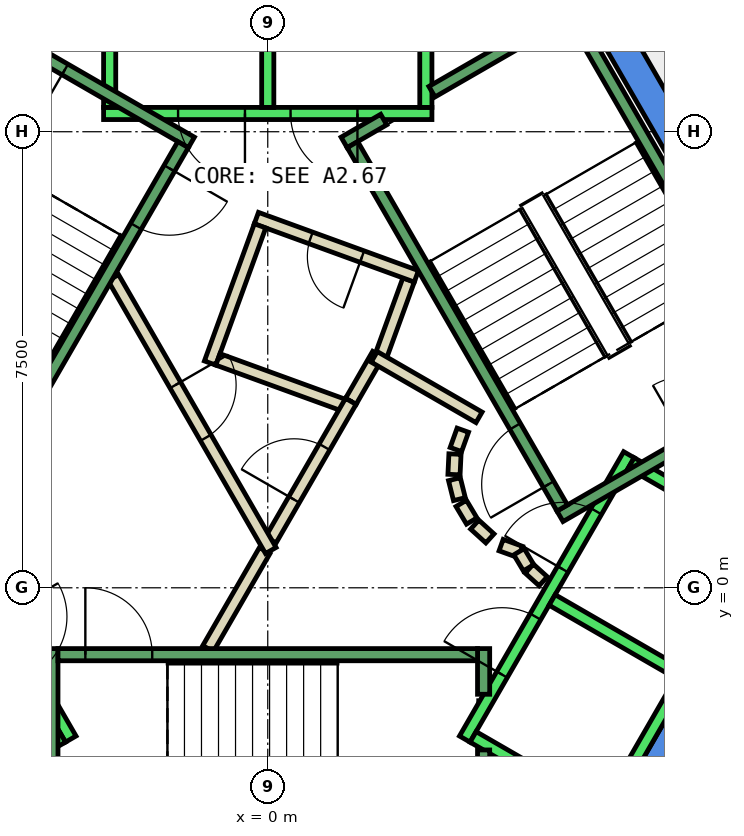
"""IFC4 building model, lengths in metres.
Left out: names, types, materials, properties, quantities, classifications, styles, units other than length and angle.
Written with IfcOpenShell. Run it as: python <this file> out.ifc"""

import sys

from ifc_helpers import new_model, si_unit, direction, frame, frame_2d, origin, place, context, subcontext, project, spatial, polyline, rectangle, outline, extrude, element, fill, save


model = new_model("IFC4")
c1 = context("Model", 3, precision=1e-05, world=origin(), true_north=direction((0.0, 1.0)))
c2 = subcontext(c1, "Body", "Model", "MODEL_VIEW")
j1 = project(units=[si_unit("LENGTHUNIT", "METRE"), si_unit("PLANEANGLEUNIT", "RADIAN")], contexts=[c1])
p1 = place(None, origin())
s1 = spatial("IfcSite", under=j1, at=p1, CompositionType="ELEMENT")
p2 = place(p1, origin())
s2 = spatial("IfcBuilding", under=s1, at=p2, CompositionType="ELEMENT")
p3 = place(p2, frame((0.0, 0.0, 318.8)))
s3 = spatial("IfcBuildingStorey", under=s2, at=p3, CompositionType="ELEMENT", Elevation=318.8)
p4 = place(p3, frame((0.0, 0.0, -0.34)))
e1 = element("IfcWall", 1, at=p4, inside=s3, PredefinedType="SHEAR", context=c2, shape_type="SweptSolid", body=[
    extrude(outline(polyline([(5.486, 9.998), (5.053, 9.748), (9.238, 2.5), (9.815, 2.5), (5.486, 9.998)])), origin(), (0.0, 0.0, 1.0), 3.6),
])
p5 = place(p3, frame((0.0, 0.0, -0.34)))
e2 = element("IfcWall", 2, at=p5, inside=s3, PredefinedType="SHEAR", context=c2, shape_type="SweptSolid", body=[
    extrude(outline(polyline([(4.907, -6.0), (9.815, 2.5), (9.238, 2.5), (4.619, -5.5), (4.907, -6.0)])), origin(), (0.0, 0.0, 1.0), 3.6),
])
p6 = place(p3, frame((1.366, 3.066, 0.0), z_axis=(0.0, 0.0, 1.0), x_axis=(0.499698775601, 0.866199245938, 0.0)))
e3 = element("IfcWall", 3, at=p6, inside=s3, PredefinedType="PARTITIONING", context=c2, shape_type="SweptSolid", body=[
    extrude(rectangle(XDim=0.893, YDim=0.2, at=frame_2d((0.446, 0.0))), origin(), (0.0, 0.0, 1.0), 3.26),
])
p7 = place(p3, frame((1.838, 3.748, 0.0), z_axis=(0.0, 0.0, 1.0), x_axis=(0.341883255813, 0.939742432475, 0.0)))
e4 = element("IfcWall", 4, at=p7, inside=s3, PredefinedType="PARTITIONING", context=c2, shape_type="SweptSolid", body=[
    extrude(rectangle(XDim=1.398, YDim=0.2, at=frame_2d((0.699, 0.0))), origin(), (0.0, 0.0, 1.0), 3.26),
])
p8 = place(p3, frame((2.444, 5.122, 0.0), z_axis=(0.0, 0.0, 1.0), x_axis=(-0.939650782256, 0.342135071873, 0.0)))
e5 = element("IfcWall", 5, at=p8, inside=s3, PredefinedType="PARTITIONING", context=c2, shape_type="SweptSolid", body=[
    extrude(rectangle(XDim=2.8, YDim=0.2, at=frame_2d((1.4, 0.0))), origin(), (0.0, 0.0, 1.0), 3.26),
])
p9 = place(p8, frame((0.95, 0.0, 0.0)))
e6 = element("IfcOpeningElement", 6, at=p9, cuts=e5, PredefinedType="OPENING", context=c2, shape_type="SweptSolid", body=[
    extrude(rectangle(XDim=0.9, YDim=2.1, at=frame_2d((0.45, 1.05))), frame((0.0, 0.11, 0.0), z_axis=(0.0, -1.0, 0.0), x_axis=(1.0, 0.0, 0.0)), (0.0, 0.0, 1.0), 0.22),
])
p10 = place(p3, frame((-0.127, 5.952, 0.0), z_axis=(0.0, 0.0, 1.0), x_axis=(-0.342012513308, -0.93969539785, 0.0)))
e7 = element("IfcWall", 7, at=p10, inside=s3, PredefinedType="PARTITIONING", context=c2, shape_type="SweptSolid", body=[
    extrude(rectangle(XDim=2.401, YDim=0.2, at=frame_2d((1.2, 0.0))), origin(), (0.0, 0.0, 1.0), 3.26),
])
p11 = place(p3, frame((-0.82, 3.756, 0.0), z_axis=(0.0, 0.0, 1.0), x_axis=(0.939740098492, -0.34188967122, 0.0)))
e8 = element("IfcWall", 8, at=p11, inside=s3, PredefinedType="PARTITIONING", context=c2, shape_type="SweptSolid", body=[
    extrude(rectangle(XDim=2.273, YDim=0.2, at=frame_2d((1.136, 0.0))), origin(), (0.0, 0.0, 1.0), 3.26),
])
p12 = place(p3, frame((-0.982, -1.0, 0.0), z_axis=(0.0, 0.0, 1.0), x_axis=(0.50024047865, 0.865886518847, 0.0)))
e9 = element("IfcWall", 9, at=p12, inside=s3, PredefinedType="PARTITIONING", context=c2, shape_type="SweptSolid", body=[
    extrude(rectangle(XDim=1.863, YDim=0.2, at=frame_2d((0.931, 0.0))), origin(), (0.0, 0.0, 1.0), 3.26),
])
p13 = place(p3, frame((0.05, 0.787, 0.0), z_axis=(0.0, 0.0, 1.0), x_axis=(0.500070457302, 0.865984721421, 0.0)))
e10 = element("IfcWall", 10, at=p13, inside=s3, PredefinedType="PARTITIONING", context=c2, shape_type="SweptSolid", body=[
    extrude(rectangle(XDim=2.631, YDim=0.2, at=frame_2d((1.316, 0.0))), origin(), (0.0, 0.0, 1.0), 3.26),
])
p14 = place(p13, frame((0.766, 0.0, 0.0)))
e11 = element("IfcOpeningElement", 11, at=p14, cuts=e10, PredefinedType="OPENING", context=c2, shape_type="SweptSolid", body=[
    extrude(rectangle(XDim=1.0, YDim=2.1, at=frame_2d((0.5, 1.05))), frame((0.0, 0.11, 0.0), z_axis=(0.0, -1.0, 0.0), x_axis=(1.0, 0.0, 0.0)), (0.0, 0.0, 1.0), 0.22),
])
p15 = place(p3, frame((1.751, 3.798, 0.0), z_axis=(0.0, 0.0, 1.0), x_axis=(0.866091650241, -0.499885240213, 0.0)))
e12 = element("IfcWall", 12, at=p15, inside=s3, PredefinedType="PARTITIONING", context=c2, shape_type="SweptSolid", body=[
    extrude(rectangle(XDim=1.991, YDim=0.2, at=frame_2d((0.995, 0.0))), origin(), (0.0, 0.0, 1.0), 3.26),
])
p16 = place(p3, frame((3.208, 2.592, 0.0), z_axis=(0.0, 0.0, 1.0), x_axis=(-0.337388820924, -0.941365382578, 0.0)))
e13 = element("IfcWall", 13, at=p16, inside=s3, PredefinedType="PARTITIONING", context=c2, shape_type="SweptSolid", body=[
    extrude(rectangle(XDim=0.338, YDim=0.2, at=frame_2d((0.169, 0.0))), origin(), (0.0, 0.0, 1.0), 3.26),
])
p17 = place(p3, frame((3.079, 2.199, 0.0), z_axis=(0.0, 0.0, 1.0), x_axis=(-0.047771483479, -0.998858290933, 0.0)))
e14 = element("IfcWall", 14, at=p17, inside=s3, PredefinedType="PARTITIONING", context=c2, shape_type="SweptSolid", body=[
    extrude(rectangle(XDim=0.337, YDim=0.2, at=frame_2d((0.169, 0.0))), origin(), (0.0, 0.0, 1.0), 3.26),
])
p18 = place(p3, frame((3.07, 1.786, 0.0), z_axis=(0.0, 0.0, 1.0), x_axis=(0.242705583207, -0.970099994784, 0.0)))
e15 = element("IfcWall", 15, at=p18, inside=s3, PredefinedType="PARTITIONING", context=c2, shape_type="SweptSolid", body=[
    extrude(rectangle(XDim=0.338, YDim=0.2, at=frame_2d((0.169, 0.0))), origin(), (0.0, 0.0, 1.0), 3.26),
])
for number, where, z_axis, x_axis in (
    (16, (3.182, 1.388, 0.0), (0.0, 0.0, 1.0), (0.512, -0.859, 0.0)),
    (17, (3.404, 1.039, 0.0), (0.0, 0.0, 1.0), (0.74, -0.672, 0.0)),
):
    element("IfcWall", number, at=place(p3, frame(where, z_axis=z_axis, x_axis=x_axis)), inside=s3, PredefinedType="PARTITIONING", context=c2, shape_type="SweptSolid", body=[
        extrude(rectangle(XDim=0.338, YDim=0.2, at=frame_2d((0.169, 0.0))), origin(), (0.0, 0.0, 1.0), 3.26),
    ])
p19 = place(p3, frame((3.838, 0.702, 0.0), z_axis=(0.0, 0.0, 1.0), x_axis=(0.941035081519, -0.338308993895, 0.0)))
e18 = element("IfcWall", 18, at=p19, inside=s3, PredefinedType="PARTITIONING", context=c2, shape_type="SweptSolid", body=[
    extrude(rectangle(XDim=0.337, YDim=0.2, at=frame_2d((0.168, 0.0))), origin(), (0.0, 0.0, 1.0), 3.26),
])
p20 = place(p3, frame((4.132, 0.593, 0.0), z_axis=(0.0, 0.0, 1.0), x_axis=(0.513561617048, -0.858052717201, 0.0)))
e19 = element("IfcWall", 19, at=p20, inside=s3, PredefinedType="PARTITIONING", context=c2, shape_type="SweptSolid", body=[
    extrude(rectangle(XDim=0.308, YDim=0.2, at=frame_2d((0.154, 0.0))), origin(), (0.0, 0.0, 1.0), 3.26),
])
p21 = place(p3, frame((4.301, 0.315, 0.0), z_axis=(0.0, 0.0, 1.0), x_axis=(0.741798017506, -0.670623367639, 0.0)))
e20 = element("IfcWall", 20, at=p21, inside=s3, PredefinedType="PARTITIONING", context=c2, shape_type="SweptSolid", body=[
    extrude(rectangle(XDim=0.309, YDim=0.2, at=frame_2d((0.154, 0.0))), origin(), (0.0, 0.0, 1.0), 3.26),
])
p22 = place(p3, frame((-2.54, 5.1, 0.0), z_axis=(0.0, 0.0, 1.0), x_axis=(0.499925051871, -0.866068670783, 0.0)))
e21 = element("IfcWall", 21, at=p22, inside=s3, PredefinedType="PARTITIONING", context=c2, shape_type="SweptSolid", body=[
    extrude(rectangle(XDim=5.181, YDim=0.2, at=frame_2d((2.59, 0.0))), origin(), (0.0, 0.0, 1.0), 3.26),
])
p23 = place(p22, frame((2.04, 0.0, 0.0)))
e22 = element("IfcOpeningElement", 22, at=p23, cuts=e21, PredefinedType="OPENING", context=c2, shape_type="SweptSolid", body=[
    extrude(rectangle(XDim=1.0, YDim=2.1, at=frame_2d((0.5, 1.05))), frame((0.0, 0.11, 0.0), z_axis=(0.0, -1.0, 0.0), x_axis=(1.0, 0.0, 0.0)), (0.0, 0.0, 1.0), 0.22),
])
p24 = place(p3, frame((2.7, 7.8, 0.0), z_axis=(0.0, 0.0, 1.0), x_axis=(-1.0, 0.0, 0.0)))
e23 = element("IfcWall", 23, at=p24, inside=s3, PredefinedType="STANDARD", context=c2, shape_type="SweptSolid", body=[
    extrude(rectangle(XDim=5.4, YDim=0.2, at=frame_2d((2.7, 0.0))), origin(), (0.0, 0.0, 1.0), 3.26),
])
p25 = place(p24, frame((1.225, 0.0, 0.0)))
e24 = element("IfcOpeningElement", 24, at=p25, cuts=e23, PredefinedType="OPENING", context=c2, shape_type="SweptSolid", body=[
    extrude(rectangle(XDim=1.1, YDim=2.1, at=frame_2d((0.55, 1.05))), frame((0.0, 0.11, 0.0), z_axis=(0.0, -1.0, 0.0), x_axis=(1.0, 0.0, 0.0)), (0.0, 0.0, 1.0), 0.22),
])
p26 = place(p24, frame((3.075, 0.0, 0.0)))
e25 = element("IfcOpeningElement", 25, at=p26, cuts=e23, PredefinedType="OPENING", context=c2, shape_type="SweptSolid", body=[
    extrude(rectangle(XDim=1.1, YDim=2.1, at=frame_2d((0.55, 1.05))), frame((0.0, 0.11, 0.0), z_axis=(0.0, -1.0, 0.0), x_axis=(1.0, 0.0, 0.0)), (0.0, 0.0, 1.0), 0.22),
])
for number, where, z_axis, x_axis in (
    (26, (2.6, 7.9, 0.0), (0.0, 0.0, 1.0), (0.0, 1.0, 0.0)),
    (27, (0.0, 7.9, 0.0), (0.0, 0.0, 1.0), (0.0, 1.0, 0.0)),
    (28, (-2.6, 7.9, 0.0), (0.0, 0.0, 1.0), (0.0, 1.0, 0.0)),
):
    element("IfcWall", number, at=place(p3, frame(where, z_axis=z_axis, x_axis=x_axis)), inside=s3, PredefinedType="STANDARD", context=c2, shape_type="SweptSolid", body=[
        extrude(rectangle(XDim=2.4, YDim=0.2, at=frame_2d((1.2, 0.0))), origin(), (0.0, 0.0, 1.0), 3.26),
    ])
p27 = place(p3, frame((-5.94, 2.188, 0.0), z_axis=(0.0, 0.0, 1.0), x_axis=(0.500034260056, -0.866005622828, 0.0)))
e29 = element("IfcWall", 29, at=p27, inside=s3, PredefinedType="STANDARD", context=c2, shape_type="SweptSolid", body=[
    extrude(rectangle(XDim=5.399, YDim=0.2, at=frame_2d((2.7, 0.0))), origin(), (0.0, 0.0, 1.0), 3.26),
])
p28 = place(p27, frame((3.075, 0.0, 0.0)))
e30 = element("IfcOpeningElement", 30, at=p28, cuts=e29, PredefinedType="OPENING", context=c2, shape_type="SweptSolid", body=[
    extrude(rectangle(XDim=1.1, YDim=2.1, at=frame_2d((0.55, 1.05))), frame((0.0, 0.11, 0.0), z_axis=(0.0, -1.0, 0.0), x_axis=(1.0, 0.0, 0.0)), (0.0, 0.0, 1.0), 0.22),
])
p29 = place(p27, frame((1.225, 0.0, 0.0)))
e31 = element("IfcOpeningElement", 31, at=p29, cuts=e29, PredefinedType="OPENING", context=c2, shape_type="SweptSolid", body=[
    extrude(rectangle(XDim=1.1, YDim=2.1, at=frame_2d((0.55, 1.05))), frame((0.0, 0.11, 0.0), z_axis=(0.0, -1.0, 0.0), x_axis=(1.0, 0.0, 0.0)), (0.0, 0.0, 1.0), 0.22),
])
p30 = place(p3, frame((-3.377, -2.452, 0.0), z_axis=(0.0, 0.0, 1.0), x_axis=(-0.865955154139, -0.50012165622, 0.0)))
e32 = element("IfcWall", 32, at=p30, inside=s3, PredefinedType="STANDARD", context=c2, shape_type="SweptSolid", body=[
    extrude(rectangle(XDim=2.4, YDim=0.2, at=frame_2d((1.2, 0.0))), origin(), (0.0, 0.0, 1.0), 3.26),
])
p31 = place(p3, frame((3.24, -2.488, 0.0), z_axis=(0.0, 0.0, 1.0), x_axis=(0.500034260056, 0.866005622828, 0.0)))
e33 = element("IfcWall", 33, at=p31, inside=s3, PredefinedType="STANDARD", context=c2, shape_type="SweptSolid", body=[
    extrude(rectangle(XDim=5.399, YDim=0.2, at=frame_2d((2.7, 0.0))), origin(), (0.0, 0.0, 1.0), 3.26),
])
p32 = place(p31, frame((3.225, 0.0, 0.0)))
e34 = element("IfcOpeningElement", 34, at=p32, cuts=e33, PredefinedType="OPENING", context=c2, shape_type="SweptSolid", body=[
    extrude(rectangle(XDim=1.1, YDim=2.1, at=frame_2d((0.55, 1.05))), frame((0.0, 0.11, 0.0), z_axis=(0.0, -1.0, 0.0), x_axis=(1.0, 0.0, 0.0)), (0.0, 0.0, 1.0), 0.22),
])
p33 = place(p31, frame((1.225, 0.0, 0.0)))
e35 = element("IfcOpeningElement", 35, at=p33, cuts=e33, PredefinedType="OPENING", context=c2, shape_type="SweptSolid", body=[
    extrude(rectangle(XDim=1.1, YDim=2.1, at=frame_2d((0.55, 1.05))), frame((0.0, 0.11, 0.0), z_axis=(0.0, -1.0, 0.0), x_axis=(1.0, 0.0, 0.0)), (0.0, 0.0, 1.0), 0.22),
])
p34 = place(p3, frame((5.492, -3.788, 0.0), z_axis=(0.0, 0.0, 1.0), x_axis=(0.500034260056, 0.866005622828, 0.0)))
e36 = element("IfcWall", 36, at=p34, inside=s3, PredefinedType="STANDARD", context=c2, shape_type="SweptSolid", body=[
    extrude(rectangle(XDim=5.399, YDim=0.2, at=frame_2d((2.7, 0.0))), origin(), (0.0, 0.0, 1.0), 3.26),
])
p35 = place(p3, frame((3.377, -2.452, 0.0), z_axis=(0.0, 0.0, 1.0), x_axis=(0.865955154139, -0.50012165622, 0.0)))
e37 = element("IfcWall", 37, at=p35, inside=s3, PredefinedType="STANDARD", context=c2, shape_type="SweptSolid", body=[
    extrude(rectangle(XDim=2.4, YDim=0.2, at=frame_2d((1.2, 0.0))), origin(), (0.0, 0.0, 1.0), 3.26),
])
for number, where, z_axis, x_axis in (
    (38, (4.677, -0.2, 0.0), (0.0, 0.0, 1.0), (0.866, -0.5, 0.0)),
    (39, (5.977, 2.052, 0.0), (0.0, 0.0, 1.0), (0.866, -0.5, 0.0)),
):
    element("IfcWall", number, at=place(p3, frame(where, z_axis=z_axis, x_axis=x_axis)), inside=s3, PredefinedType="STANDARD", context=c2, shape_type="SweptSolid", body=[
        extrude(rectangle(XDim=2.399, YDim=0.2, at=frame_2d((1.2, 0.0))), origin(), (0.0, 0.0, 1.0), 3.26),
    ])
p36 = place(p3, frame((-3.55, -1.0, 0.0), z_axis=(0.0, 0.0, 1.0), x_axis=(0.0, -1.0, 0.0)))
e40 = element("IfcWall", 40, at=p36, inside=s3, PredefinedType="STANDARD", context=c2, shape_type="SweptSolid", body=[
    extrude(rectangle(XDim=4.4, YDim=0.2, at=frame_2d((2.2, 0.0))), origin(), (0.0, 0.0, 1.0), 3.26),
])
p37 = place(p36, frame((2.4, 0.0, 0.0)))
e41 = element("IfcOpeningElement", 41, at=p37, cuts=e40, PredefinedType="OPENING", context=c2, shape_type="SweptSolid", body=[
    extrude(rectangle(XDim=1.1, YDim=2.2, at=frame_2d((0.55, 1.1))), frame((0.0, 0.11, 0.0), z_axis=(0.0, -1.0, 0.0), x_axis=(1.0, 0.0, 0.0)), (0.0, 0.0, 1.0), 0.22),
])
p38 = place(p3, frame((3.55, -2.667, 0.0), z_axis=(0.0, 0.0, 1.0), x_axis=(0.0, -1.0, 0.0)))
e42 = element("IfcWall", 42, at=p38, inside=s3, PredefinedType="STANDARD", context=c2, shape_type="SweptSolid", body=[
    extrude(rectangle(XDim=2.733, YDim=0.2, at=frame_2d((1.366, 0.0))), origin(), (0.0, 0.0, 1.0), 3.26),
])
p39 = place(p3, frame((3.55, -1.0, 0.0), z_axis=(0.0, 0.0, 1.0), x_axis=(0.0, -1.0, 0.0)))
e43 = element("IfcWall", 43, at=p39, inside=s3, PredefinedType="STANDARD", context=c2, shape_type="SweptSolid", body=[
    extrude(rectangle(XDim=0.751, YDim=0.2, at=frame_2d((0.375, 0.0))), origin(), (0.0, 0.0, 1.0), 3.26),
])
p40 = place(p3, frame((-3.45, -1.1, 0.0), z_axis=(0.0, 0.0, 1.0), x_axis=(1.0, 0.0, 0.0)))
e44 = element("IfcWall", 44, at=p40, inside=s3, PredefinedType="STANDARD", context=c2, shape_type="SweptSolid", body=[
    extrude(rectangle(XDim=6.9, YDim=0.2, at=frame_2d((3.45, 0.0))), origin(), (0.0, 0.0, 1.0), 3.26),
])
p41 = place(p40, frame((0.45, 0.0, 0.0)))
e45 = element("IfcOpeningElement", 45, at=p41, cuts=e44, PredefinedType="OPENING", context=c2, shape_type="SweptSolid", body=[
    extrude(rectangle(XDim=1.1, YDim=2.2, at=frame_2d((0.55, 1.1))), frame((0.0, 0.11, 0.0), z_axis=(0.0, -1.0, 0.0), x_axis=(1.0, 0.0, 0.0)), (0.0, 0.0, 1.0), 0.22),
])
p42 = place(p3, frame((4.806, 1.176, 0.0), z_axis=(0.0, 0.0, 1.0), x_axis=(0.866059941101, 0.499940174841, 0.0)))
e46 = element("IfcWall", 46, at=p42, inside=s3, PredefinedType="STANDARD", context=c2, shape_type="SweptSolid", body=[
    extrude(rectangle(XDim=4.4, YDim=0.2, at=frame_2d((2.2, 0.0))), origin(), (0.0, 0.0, 1.0), 3.26),
])
p43 = place(p42, frame((2.4, 0.0, 0.0)))
e47 = element("IfcOpeningElement", 47, at=p43, cuts=e46, PredefinedType="OPENING", context=c2, shape_type="SweptSolid", body=[
    extrude(rectangle(XDim=1.1, YDim=2.2, at=frame_2d((0.55, 1.1))), frame((0.0, 0.11, 0.0), z_axis=(0.0, -1.0, 0.0), x_axis=(1.0, 0.0, 0.0)), (0.0, 0.0, 1.0), 0.22),
])
p44 = place(p3, frame((2.7, 8.158, 0.0), z_axis=(0.0, 0.0, 1.0), x_axis=(0.86611865017, 0.499838457731, 0.0)))
e48 = element("IfcWall", 48, at=p44, inside=s3, PredefinedType="STANDARD", context=c2, shape_type="SweptSolid", body=[
    extrude(rectangle(XDim=2.733, YDim=0.2, at=frame_2d((1.366, 0.0))), origin(), (0.0, 0.0, 1.0), 3.26),
])
p45 = place(p3, frame((1.256, 7.324, 0.0), z_axis=(0.0, 0.0, 1.0), x_axis=(0.865915093549, 0.500191014278, 0.0)))
e49 = element("IfcWall", 49, at=p45, inside=s3, PredefinedType="STANDARD", context=c2, shape_type="SweptSolid", body=[
    extrude(rectangle(XDim=0.752, YDim=0.2, at=frame_2d((0.376, 0.0))), origin(), (0.0, 0.0, 1.0), 3.26),
])
p46 = place(p3, frame((4.843, 1.312, 0.0), z_axis=(0.0, 0.0, 1.0), x_axis=(-0.499963383562, 0.866046543262, 0.0)))
e50 = element("IfcWall", 50, at=p46, inside=s3, PredefinedType="STANDARD", context=c2, shape_type="SweptSolid", body=[
    extrude(rectangle(XDim=6.9, YDim=0.2, at=frame_2d((3.45, 0.0))), origin(), (0.0, 0.0, 1.0), 3.26),
])
p47 = place(p46, frame((0.45, 0.0, 0.0)))
e51 = element("IfcOpeningElement", 51, at=p47, cuts=e50, PredefinedType="OPENING", context=c2, shape_type="SweptSolid", body=[
    extrude(rectangle(XDim=1.1, YDim=2.2, at=frame_2d((0.55, 1.1))), frame((0.0, 0.11, 0.0), z_axis=(0.0, -1.0, 0.0), x_axis=(1.0, 0.0, 0.0)), (0.0, 0.0, 1.0), 0.22),
])
p48 = place(p3, frame((8.48, 3.412, 0.0), z_axis=(0.0, 0.0, 1.0), x_axis=(-0.499978703459, 0.866037698999, 0.0)))
e52 = element("IfcWall", 52, at=p48, inside=s3, PredefinedType="STANDARD", context=c2, shape_type="SweptSolid", body=[
    extrude(rectangle(XDim=6.9, YDim=0.2, at=frame_2d((3.45, 0.0))), origin(), (0.0, 0.0, 1.0), 3.26),
])
p49 = place(p3, frame((-1.256, 7.324, 0.0), z_axis=(0.0, 0.0, 1.0), x_axis=(-0.866046073146, 0.499964197906, 0.0)))
e53 = element("IfcWall", 53, at=p49, inside=s3, PredefinedType="STANDARD", context=c2, shape_type="SweptSolid", body=[
    extrude(rectangle(XDim=4.4, YDim=0.2, at=frame_2d((2.2, 0.0))), origin(), (0.0, 0.0, 1.0), 3.26),
])
p50 = place(p49, frame((2.4, 0.0, 0.0)))
e54 = element("IfcOpeningElement", 54, at=p50, cuts=e53, PredefinedType="OPENING", context=c2, shape_type="SweptSolid", body=[
    extrude(rectangle(XDim=1.1, YDim=2.2, at=frame_2d((0.55, 1.1))), frame((0.0, 0.11, 0.0), z_axis=(0.0, -1.0, 0.0), x_axis=(1.0, 0.0, 0.0)), (0.0, 0.0, 1.0), 0.22),
])
p51 = place(p3, frame((-1.393, 7.288, 0.0), z_axis=(0.0, 0.0, 1.0), x_axis=(-0.499963383562, -0.866046543262, 0.0)))
e55 = element("IfcWall", 55, at=p51, inside=s3, PredefinedType="STANDARD", context=c2, shape_type="SweptSolid", body=[
    extrude(rectangle(XDim=6.9, YDim=0.2, at=frame_2d((3.45, 0.0))), origin(), (0.0, 0.0, 1.0), 3.26),
])
p52 = place(p51, frame((0.45, 0.0, 0.0)))
e56 = element("IfcOpeningElement", 56, at=p52, cuts=e55, PredefinedType="OPENING", context=c2, shape_type="SweptSolid", body=[
    extrude(rectangle(XDim=1.1, YDim=2.2, at=frame_2d((0.55, 1.1))), frame((0.0, 0.11, 0.0), z_axis=(0.0, -1.0, 0.0), x_axis=(1.0, 0.0, 0.0)), (0.0, 0.0, 1.0), 0.22),
])
p53 = place(p14, origin())
e57 = element("IfcDoor", 57, at=p53, inside=s3, OperationType="SINGLE_SWING_RIGHT", PredefinedType="DOOR", context=c2, shape_type="SweptSolid", body=[
    extrude(rectangle(XDim=1.0, YDim=2.1, at=frame_2d((0.5, 1.05))), frame((0.0, 0.025, 0.0), z_axis=(0.0, -1.0, 0.0), x_axis=(1.0, 0.0, 0.0)), (0.0, 0.0, 1.0), 0.05),
])
fill(e11, e57)
p54 = place(p23, origin())
e58 = element("IfcDoor", 58, at=p54, inside=s3, OperationType="SINGLE_SWING_RIGHT", PredefinedType="DOOR", context=c2, shape_type="SweptSolid", body=[
    extrude(rectangle(XDim=1.0, YDim=2.1, at=frame_2d((0.5, 1.05))), frame((0.0, 0.025, 0.0), z_axis=(0.0, -1.0, 0.0), x_axis=(1.0, 0.0, 0.0)), (0.0, 0.0, 1.0), 0.05),
])
fill(e22, e58)
p55 = place(p9, origin())
e59 = element("IfcDoor", 59, at=p55, inside=s3, OperationType="SINGLE_SWING_LEFT", PredefinedType="DOOR", context=c2, shape_type="SweptSolid", body=[
    extrude(rectangle(XDim=0.9, YDim=2.1, at=frame_2d((0.45, 1.05))), frame((0.0, 0.025, 0.0), z_axis=(0.0, -1.0, 0.0), x_axis=(1.0, 0.0, 0.0)), (0.0, 0.0, 1.0), 0.05),
])
fill(e6, e59)
p56 = place(p25, origin())
e60 = element("IfcDoor", 60, at=p56, inside=s3, OperationType="SLIDING_TO_LEFT", PredefinedType="DOOR", context=c2, shape_type="SweptSolid", body=[
    extrude(rectangle(XDim=1.1, YDim=2.1, at=frame_2d((0.55, 1.05))), frame((0.0, 0.025, 0.0), z_axis=(0.0, -1.0, 0.0), x_axis=(1.0, 0.0, 0.0)), (0.0, 0.0, 1.0), 0.05),
])
fill(e24, e60)
p57 = place(p26, origin())
e61 = element("IfcDoor", 61, at=p57, inside=s3, OperationType="SLIDING_TO_LEFT", PredefinedType="DOOR", context=c2, shape_type="SweptSolid", body=[
    extrude(rectangle(XDim=1.1, YDim=2.1, at=frame_2d((0.55, 1.05))), frame((0.0, 0.025, 0.0), z_axis=(0.0, -1.0, 0.0), x_axis=(1.0, 0.0, 0.0)), (0.0, 0.0, 1.0), 0.05),
])
fill(e25, e61)
p58 = place(p32, origin())
e62 = element("IfcDoor", 62, at=p58, inside=s3, OperationType="SLIDING_TO_LEFT", PredefinedType="DOOR", context=c2, shape_type="SweptSolid", body=[
    extrude(rectangle(XDim=1.1, YDim=2.1, at=frame_2d((0.55, 1.05))), frame((0.0, 0.025, 0.0), z_axis=(0.0, -1.0, 0.0), x_axis=(1.0, 0.0, 0.0)), (0.0, 0.0, 1.0), 0.05),
])
fill(e34, e62)
p59 = place(p33, origin())
e63 = element("IfcDoor", 63, at=p59, inside=s3, OperationType="SLIDING_TO_LEFT", PredefinedType="DOOR", context=c2, shape_type="SweptSolid", body=[
    extrude(rectangle(XDim=1.1, YDim=2.1, at=frame_2d((0.55, 1.05))), frame((0.0, 0.025, 0.0), z_axis=(0.0, -1.0, 0.0), x_axis=(1.0, 0.0, 0.0)), (0.0, 0.0, 1.0), 0.05),
])
fill(e35, e63)
p60 = place(p41, origin())
e64 = element("IfcDoor", 64, at=p60, inside=s3, OperationType="SINGLE_SWING_LEFT", PredefinedType="DOOR", context=c2, shape_type="SweptSolid", body=[
    extrude(rectangle(XDim=1.1, YDim=2.2, at=frame_2d((0.55, 1.1))), frame((0.0, 0.025, 0.0), z_axis=(0.0, -1.0, 0.0), x_axis=(1.0, 0.0, 0.0)), (0.0, 0.0, 1.0), 0.05),
])
fill(e45, e64)
p61 = place(p47, origin())
e65 = element("IfcDoor", 65, at=p61, inside=s3, OperationType="SINGLE_SWING_LEFT", PredefinedType="DOOR", context=c2, shape_type="SweptSolid", body=[
    extrude(rectangle(XDim=1.1, YDim=2.2, at=frame_2d((0.55, 1.1))), frame((0.0, 0.025, 0.0), z_axis=(0.0, -1.0, 0.0), x_axis=(1.0, 0.0, 0.0)), (0.0, 0.0, 1.0), 0.05),
])
fill(e51, e65)
p62 = place(p52, origin())
e66 = element("IfcDoor", 66, at=p62, inside=s3, OperationType="SINGLE_SWING_LEFT", PredefinedType="DOOR", context=c2, shape_type="SweptSolid", body=[
    extrude(rectangle(XDim=1.1, YDim=2.2, at=frame_2d((0.55, 1.1))), frame((0.0, 0.025, 0.0), z_axis=(0.0, -1.0, 0.0), x_axis=(1.0, 0.0, 0.0)), (0.0, 0.0, 1.0), 0.05),
])
fill(e56, e66)
p63 = place(p50, origin())
e67 = element("IfcDoor", 67, at=p63, inside=s3, OperationType="SINGLE_SWING_LEFT", PredefinedType="DOOR", context=c2, shape_type="SweptSolid", body=[
    extrude(rectangle(XDim=1.1, YDim=2.2, at=frame_2d((0.55, 1.1))), frame((0.0, 0.025, 0.0), z_axis=(0.0, -1.0, 0.0), x_axis=(1.0, 0.0, 0.0)), (0.0, 0.0, 1.0), 0.05),
])
fill(e54, e67)
save(model, sys.argv[1])
